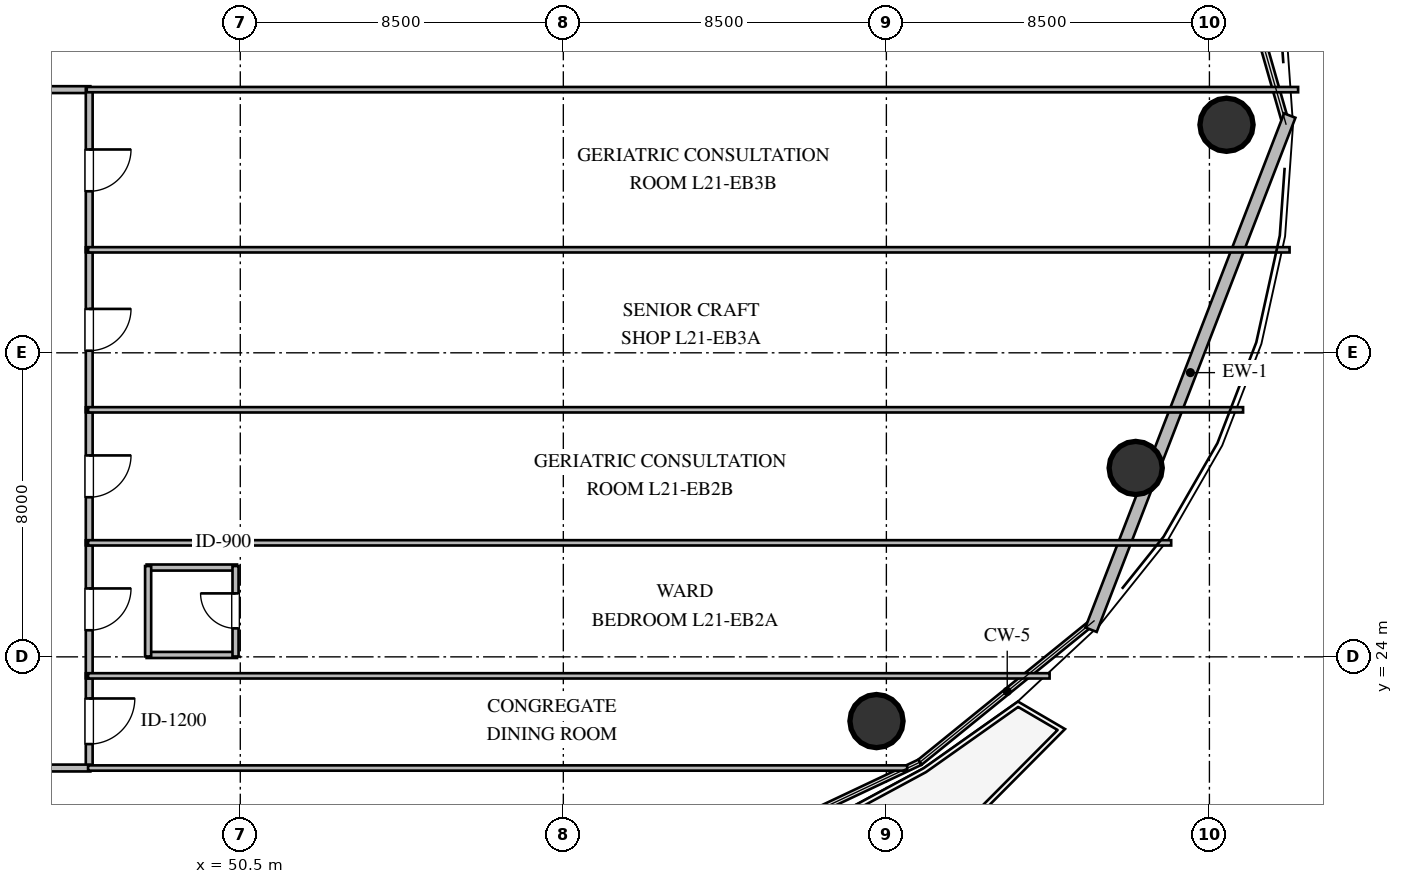
"""IFC4 building model, lengths in metres.
Left out: names, types, materials, properties, quantities, classifications, styles, units other than length and angle.
Written with IfcOpenShell. Run it as: python <this file> out.ifc"""

import sys

from ifc_helpers import new_model, si_unit, direction, frame, frame_2d, origin, origin_2d, place, context, subcontext, project, spatial, rectangle, circle, extrude, element, fill, save


model = new_model("IFC4")
c1 = context("Model", 3, precision=1e-05, world=origin(), true_north=direction((0.0, 1.0)))
c2 = subcontext(c1, "Body", "Model", "MODEL_VIEW")
j1 = project(units=[si_unit("LENGTHUNIT", "METRE"), si_unit("PLANEANGLEUNIT", "RADIAN")], contexts=[c1])
p1 = place(None, origin())
s1 = spatial("IfcSite", under=j1, at=p1, CompositionType="ELEMENT")
p2 = place(p1, origin())
s2 = spatial("IfcBuilding", under=s1, at=p2, CompositionType="ELEMENT")
p3 = place(p2, frame((0.0, 0.0, 81.6)))
s3 = spatial("IfcBuildingStorey", under=s2, at=p3, CompositionType="ELEMENT", Elevation=81.6)
for number, where, z_axis, x_axis in (
    (1, (76.45, 38.0, 0.0), (0.0, 0.0, 1.0), (1.0, 0.0, 0.0)),
    (2, (67.24, 22.31, 0.0), (0.0, 0.0, 1.0), (1.0, 0.0, 0.0)),
    (3, (74.06, 28.97, 0.0), (0.0, 0.0, 1.0), (1.0, 0.0, 0.0)),
):
    element("IfcColumn", number, at=place(p3, frame(where, z_axis=z_axis, x_axis=x_axis)), inside=s3, PredefinedType="COLUMN", context=c2, shape_type="SweptSolid", body=[
        extrude(circle(Radius=0.7, at=origin_2d()), origin(), (0.0, 0.0, 1.0), 3.6),
    ])
p4 = place(p3, frame((78.114, 38.243, 0.0), z_axis=(0.0, 0.0, 1.0), x_axis=(-0.360517110943, -0.932752599952, 0.0)))
e4 = element("IfcWall", 4, at=p4, inside=s3, PredefinedType="STANDARD", context=c2, shape_type="SweptSolid", body=[
    extrude(rectangle(XDim=14.504, YDim=0.32, at=frame_2d((7.252, 0.0))), origin(), (0.0, 0.0, 1.0), 2.738),
])
p5 = place(p3, frame((48.035, 24.05, 0.0), z_axis=(0.0, 0.0, 1.0), x_axis=(1.0, 0.0, 0.0)))
e5 = element("IfcWall", 5, at=p5, inside=s3, PredefinedType="PLUMBINGWALL", context=c2, shape_type="SweptSolid", body=[
    extrude(rectangle(XDim=2.38, YDim=0.16, at=frame_2d((1.19, 0.0))), origin(), (0.0, 0.0, 1.0), 2.89),
])
p6 = place(p3, frame((48.035, 26.35, 0.0), z_axis=(0.0, 0.0, 1.0), x_axis=(1.0, 0.0, 0.0)))
e6 = element("IfcWall", 6, at=p6, inside=s3, PredefinedType="PLUMBINGWALL", context=c2, shape_type="SweptSolid", body=[
    extrude(rectangle(XDim=2.38, YDim=0.16, at=frame_2d((1.19, 0.0))), origin(), (0.0, 0.0, 1.0), 3.36),
])
p7 = place(p3, frame((48.075, 24.01, 0.0), z_axis=(0.0, 0.0, 1.0), x_axis=(0.0, 1.0, 0.0)))
e7 = element("IfcWall", 7, at=p7, inside=s3, PredefinedType="PLUMBINGWALL", context=c2, shape_type="SweptSolid", body=[
    extrude(rectangle(XDim=2.38, YDim=0.16, at=frame_2d((1.19, 0.0))), origin(), (0.0, 0.0, 1.0), 3.36),
])
p8 = place(p3, frame((50.375, 24.01, 0.0), z_axis=(0.0, 0.0, 1.0), x_axis=(0.0, 1.0, 0.0)))
e8 = element("IfcWall", 8, at=p8, inside=s3, PredefinedType="PLUMBINGWALL", context=c2, shape_type="SweptSolid", body=[
    extrude(rectangle(XDim=2.38, YDim=0.16, at=frame_2d((1.19, 0.0))), origin(), (0.0, 0.0, 1.0), 3.36),
])
p9 = place(p8, frame((0.74, 0.0, 0.0)))
e9 = element("IfcOpeningElement", 9, at=p9, cuts=e8, PredefinedType="OPENING", context=c2, shape_type="SweptSolid", body=[
    extrude(rectangle(XDim=0.92, YDim=2.1, at=frame_2d((0.46, 1.05))), frame((0.0, 0.09, 0.0), z_axis=(0.0, -1.0, 0.0), x_axis=(1.0, 0.0, 0.0)), (0.0, 0.0, 1.0), 0.18),
])
p10 = place(p3, frame((41.935, 38.925, 0.0), z_axis=(0.0, 0.0, 1.0), x_axis=(1.0, 0.0, 0.0)))
e10 = element("IfcWall", 10, at=p10, inside=s3, PredefinedType="PARTITIONING", context=c2, shape_type="SweptSolid", body=[
    extrude(rectangle(XDim=4.62, YDim=0.18, at=frame_2d((2.31, 0.0))), origin(), (0.0, 0.0, 1.0), 3.36),
])
p11 = place(p10, frame((1.76, 0.0, 0.0)))
e11 = element("IfcOpeningElement", 11, at=p11, cuts=e10, PredefinedType="OPENING", context=c2, shape_type="SweptSolid", body=[
    extrude(rectangle(XDim=1.1, YDim=2.1, at=frame_2d((0.55, 1.05))), frame((0.0, 0.1, 0.0), z_axis=(0.0, -1.0, 0.0), x_axis=(1.0, 0.0, 0.0)), (0.0, 0.0, 1.0), 0.2),
])
p12 = place(p3, frame((46.525, 23.565, 0.0), z_axis=(0.0, 0.0, 1.0), x_axis=(0.0, -1.0, 0.0)))
e12 = element("IfcWall", 12, at=p12, inside=s3, PredefinedType="PARTITIONING", context=c2, shape_type="SweptSolid", body=[
    extrude(rectangle(XDim=2.52, YDim=0.18, at=frame_2d((1.26, 0.0))), origin(), (0.0, 0.0, 1.0), 3.36),
])
p13 = place(p12, frame((0.66, 0.0, 0.0)))
e13 = element("IfcOpeningElement", 13, at=p13, cuts=e12, PredefinedType="OPENING", context=c2, shape_type="SweptSolid", body=[
    extrude(rectangle(XDim=1.2, YDim=2.15, at=frame_2d((0.6, 1.075))), frame((0.0, 0.1, 0.0), z_axis=(0.0, -1.0, 0.0), x_axis=(1.0, 0.0, 0.0)), (0.0, 0.0, 1.0), 0.2),
])
p14 = place(p3, frame((46.525, 27.065, 0.0), z_axis=(0.0, 0.0, 1.0), x_axis=(0.0, -1.0, 0.0)))
e14 = element("IfcWall", 14, at=p14, inside=s3, PredefinedType="PARTITIONING", context=c2, shape_type="SweptSolid", body=[
    extrude(rectangle(XDim=3.63, YDim=0.18, at=frame_2d((1.815, 0.0))), origin(), (0.0, 0.0, 1.0), 3.36),
])
p15 = place(p14, frame((1.265, 0.0, 0.0)))
e15 = element("IfcOpeningElement", 15, at=p15, cuts=e14, PredefinedType="OPENING", context=c2, shape_type="SweptSolid", body=[
    extrude(rectangle(XDim=1.1, YDim=2.1, at=frame_2d((0.55, 1.05))), frame((0.0, 0.1, 0.0), z_axis=(0.0, -1.0, 0.0), x_axis=(1.0, 0.0, 0.0)), (0.0, 0.0, 1.0), 0.2),
])
p16 = place(p3, frame((46.525, 30.565, 0.0), z_axis=(0.0, 0.0, 1.0), x_axis=(0.0, -1.0, 0.0)))
e16 = element("IfcWall", 16, at=p16, inside=s3, PredefinedType="PARTITIONING", context=c2, shape_type="SweptSolid", body=[
    extrude(rectangle(XDim=3.63, YDim=0.18, at=frame_2d((1.815, 0.0))), origin(), (0.0, 0.0, 1.0), 3.36),
])
p17 = place(p16, frame((1.265, 0.0, 0.0)))
e17 = element("IfcOpeningElement", 17, at=p17, cuts=e16, PredefinedType="OPENING", context=c2, shape_type="SweptSolid", body=[
    extrude(rectangle(XDim=1.1, YDim=2.1, at=frame_2d((0.55, 1.05))), frame((0.0, 0.1, 0.0), z_axis=(0.0, -1.0, 0.0), x_axis=(1.0, 0.0, 0.0)), (0.0, 0.0, 1.0), 0.2),
])
p18 = place(p3, frame((46.525, 34.775, 0.0), z_axis=(0.0, 0.0, 1.0), x_axis=(0.0, -1.0, 0.0)))
e18 = element("IfcWall", 18, at=p18, inside=s3, PredefinedType="PARTITIONING", context=c2, shape_type="SweptSolid", body=[
    extrude(rectangle(XDim=4.34, YDim=0.18, at=frame_2d((2.17, 0.0))), origin(), (0.0, 0.0, 1.0), 3.36),
])
p19 = place(p18, frame((1.62, 0.0, 0.0)))
e19 = element("IfcOpeningElement", 19, at=p19, cuts=e18, PredefinedType="OPENING", context=c2, shape_type="SweptSolid", body=[
    extrude(rectangle(XDim=1.1, YDim=2.1, at=frame_2d((0.55, 1.05))), frame((0.0, 0.1, 0.0), z_axis=(0.0, -1.0, 0.0), x_axis=(1.0, 0.0, 0.0)), (0.0, 0.0, 1.0), 0.2),
])
p20 = place(p3, frame((46.525, 38.955, 0.0), z_axis=(0.0, 0.0, 1.0), x_axis=(0.0, -1.0, 0.0)))
e20 = element("IfcWall", 20, at=p20, inside=s3, PredefinedType="PARTITIONING", context=c2, shape_type="SweptSolid", body=[
    extrude(rectangle(XDim=4.31, YDim=0.18, at=frame_2d((2.155, 0.0))), origin(), (0.0, 0.0, 1.0), 3.36),
])
p21 = place(p20, frame((1.605, 0.0, 0.0)))
e21 = element("IfcOpeningElement", 21, at=p21, cuts=e20, PredefinedType="OPENING", context=c2, shape_type="SweptSolid", body=[
    extrude(rectangle(XDim=1.1, YDim=2.1, at=frame_2d((0.55, 1.05))), frame((0.0, 0.1, 0.0), z_axis=(0.0, -1.0, 0.0), x_axis=(1.0, 0.0, 0.0)), (0.0, 0.0, 1.0), 0.2),
])
p22 = place(p3, frame((46.555, 21.075, 0.0), z_axis=(0.0, 0.0, 1.0), x_axis=(-1.0, 0.0, 0.0)))
e22 = element("IfcWall", 22, at=p22, inside=s3, PredefinedType="PARTITIONING", context=c2, shape_type="SweptSolid", body=[
    extrude(rectangle(XDim=11.12, YDim=0.18, at=frame_2d((5.56, 0.0))), origin(), (0.0, 0.0, 1.0), 2.996),
])
p23 = place(p22, frame((4.96, 0.0, 0.0)))
e23 = element("IfcOpeningElement", 23, at=p23, cuts=e22, PredefinedType="OPENING", context=c2, shape_type="SweptSolid", body=[
    extrude(rectangle(XDim=1.2, YDim=2.15, at=frame_2d((0.6, 1.075))), frame((0.0, 0.1, 0.0), z_axis=(0.0, -1.0, 0.0), x_axis=(1.0, 0.0, 0.0)), (0.0, 0.0, 1.0), 0.2),
])
p24 = place(p3, frame((78.334, 38.925, 0.0), z_axis=(0.0, 0.0, 1.0), x_axis=(-1.0, 0.0, 0.0)))
e24 = element("IfcWall", 24, at=p24, inside=s3, PredefinedType="PARTITIONING", context=c2, shape_type="SweptSolid", body=[
    extrude(rectangle(XDim=31.874, YDim=0.14, at=frame_2d((15.937, 0.0))), origin(), (0.0, 0.0, 1.0), 3.36),
])
p25 = place(p3, frame((46.495, 23.5, 0.0), z_axis=(0.0, 0.0, 1.0), x_axis=(1.0, 0.0, 0.0)))
e25 = element("IfcWall", 25, at=p25, inside=s3, PredefinedType="PARTITIONING", context=c2, shape_type="SweptSolid", body=[
    extrude(rectangle(XDim=25.3, YDim=0.14, at=frame_2d((12.65, 0.0))), origin(), (0.0, 0.0, 1.0), 2.89),
])
p26 = place(p3, frame((68.049, 21.075, 0.0), z_axis=(0.0, 0.0, 1.0), x_axis=(-1.0, 0.0, 0.0)))
e26 = element("IfcWall", 26, at=p26, inside=s3, PredefinedType="PARTITIONING", context=c2, shape_type="SweptSolid", body=[
    extrude(rectangle(XDim=21.554, YDim=0.14, at=frame_2d((10.777, 0.0))), origin(), (0.0, 0.0, 1.0), 2.996),
])
p27 = place(p3, frame((46.495, 27.0, 0.0), z_axis=(0.0, 0.0, 1.0), x_axis=(1.0, 0.0, 0.0)))
e27 = element("IfcWall", 27, at=p27, inside=s3, PredefinedType="PARTITIONING", context=c2, shape_type="SweptSolid", body=[
    extrude(rectangle(XDim=28.499, YDim=0.14, at=frame_2d((14.25, 0.0))), origin(), (0.0, 0.0, 1.0), 2.89),
])
p28 = place(p3, frame((46.495, 30.5, 0.0), z_axis=(0.0, 0.0, 1.0), x_axis=(1.0, 0.0, 0.0)))
e28 = element("IfcWall", 28, at=p28, inside=s3, PredefinedType="PARTITIONING", context=c2, shape_type="SweptSolid", body=[
    extrude(rectangle(XDim=30.391, YDim=0.14, at=frame_2d((15.195, 0.0))), origin(), (0.0, 0.0, 1.0), 3.36),
])
p29 = place(p3, frame((46.495, 34.71, 0.0), z_axis=(0.0, 0.0, 1.0), x_axis=(1.0, 0.0, 0.0)))
e29 = element("IfcWall", 29, at=p29, inside=s3, PredefinedType="PARTITIONING", context=c2, shape_type="SweptSolid", body=[
    extrude(rectangle(XDim=31.614, YDim=0.14, at=frame_2d((15.807, 0.0))), origin(), (0.0, 0.0, 1.0), 3.36),
])
p30 = place(p9, origin())
e30 = element("IfcDoor", 30, at=p30, inside=s3, OperationType="SINGLE_SWING_RIGHT", PredefinedType="DOOR", context=c2, shape_type="SweptSolid", body=[
    extrude(rectangle(XDim=0.92, YDim=2.1, at=frame_2d((0.46, 1.05))), frame((0.0, 0.025, 0.0), z_axis=(0.0, -1.0, 0.0), x_axis=(1.0, 0.0, 0.0)), (0.0, 0.0, 1.0), 0.05),
])
fill(e9, e30)
p31 = place(p13, origin())
e31 = element("IfcDoor", 31, at=p31, inside=s3, OperationType="SINGLE_SWING_LEFT", PredefinedType="DOOR", context=c2, shape_type="SweptSolid", body=[
    extrude(rectangle(XDim=1.2, YDim=2.15, at=frame_2d((0.6, 1.075))), frame((0.0, 0.025, 0.0), z_axis=(0.0, -1.0, 0.0), x_axis=(1.0, 0.0, 0.0)), (0.0, 0.0, 1.0), 0.05),
])
fill(e13, e31)
p32 = place(p15, origin())
e32 = element("IfcDoor", 32, at=p32, inside=s3, OperationType="SINGLE_SWING_LEFT", PredefinedType="DOOR", context=c2, shape_type="SweptSolid", body=[
    extrude(rectangle(XDim=1.1, YDim=2.1, at=frame_2d((0.55, 1.05))), frame((0.0, 0.025, 0.0), z_axis=(0.0, -1.0, 0.0), x_axis=(1.0, 0.0, 0.0)), (0.0, 0.0, 1.0), 0.05),
])
fill(e15, e32)
p33 = place(p17, origin())
e33 = element("IfcDoor", 33, at=p33, inside=s3, OperationType="SINGLE_SWING_LEFT", PredefinedType="DOOR", context=c2, shape_type="SweptSolid", body=[
    extrude(rectangle(XDim=1.1, YDim=2.1, at=frame_2d((0.55, 1.05))), frame((0.0, 0.025, 0.0), z_axis=(0.0, -1.0, 0.0), x_axis=(1.0, 0.0, 0.0)), (0.0, 0.0, 1.0), 0.05),
])
fill(e17, e33)
p34 = place(p19, origin())
e34 = element("IfcDoor", 34, at=p34, inside=s3, OperationType="SINGLE_SWING_LEFT", PredefinedType="DOOR", context=c2, shape_type="SweptSolid", body=[
    extrude(rectangle(XDim=1.1, YDim=2.1, at=frame_2d((0.55, 1.05))), frame((0.0, 0.025, 0.0), z_axis=(0.0, -1.0, 0.0), x_axis=(1.0, 0.0, 0.0)), (0.0, 0.0, 1.0), 0.05),
])
fill(e19, e34)
p35 = place(p21, origin())
e35 = element("IfcDoor", 35, at=p35, inside=s3, OperationType="SINGLE_SWING_LEFT", PredefinedType="DOOR", context=c2, shape_type="SweptSolid", body=[
    extrude(rectangle(XDim=1.1, YDim=2.1, at=frame_2d((0.55, 1.05))), frame((0.0, 0.025, 0.0), z_axis=(0.0, -1.0, 0.0), x_axis=(1.0, 0.0, 0.0)), (0.0, 0.0, 1.0), 0.05),
])
fill(e21, e35)
save(model, sys.argv[1])
